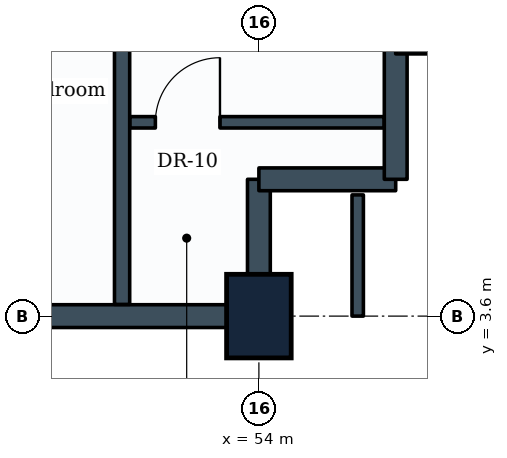
"""IFC4 building model, lengths in metres.
Left out: names, types, materials, properties, quantities, classifications, styles, units other than length and angle.
Written with IfcOpenShell. Run it as: python <this file> out.ifc"""

import sys

from ifc_helpers import new_model, si_unit, direction, frame, frame_2d, origin, origin_2d, place, context, subcontext, project, spatial, rectangle, extrude, element, fill, save


model = new_model("IFC4")
c1 = context("Model", 3, precision=1e-05, world=origin(), true_north=direction((0.0, 1.0)))
c2 = subcontext(c1, "Body", "Model", "MODEL_VIEW")
j1 = project(units=[si_unit("LENGTHUNIT", "METRE"), si_unit("PLANEANGLEUNIT", "RADIAN")], contexts=[c1])
p1 = place(None, origin())
s1 = spatial("IfcSite", under=j1, at=p1, CompositionType="ELEMENT")
p2 = place(p1, origin())
s2 = spatial("IfcBuilding", under=s1, at=p2, CompositionType="ELEMENT")
p3 = place(p2, frame((0.0, 0.0, 123.8)))
s3 = spatial("IfcBuildingStorey", under=s2, at=p3, CompositionType="ELEMENT", Elevation=123.8)
p4 = place(p3, frame((54.0, 3.6, 0.0), z_axis=(0.0, 0.0, 1.0), x_axis=(1.0, 0.0, 0.0)))
e1 = element("IfcColumn", 1, at=p4, inside=s3, PredefinedType="COLUMN", context=c2, shape_type="SweptSolid", body=[
    extrude(rectangle(XDim=0.85, YDim=1.1, at=origin_2d()), origin(), (0.0, 0.0, 1.0), 3.8),
])
p5 = place(p3, frame((54.0, 3.6, 0.0), z_axis=(0.0, 0.0, 1.0), x_axis=(-1.0, 0.0, 0.0)))
e2 = element("IfcWall", 2, at=p5, inside=s3, PredefinedType="STANDARD", context=c2, shape_type="SweptSolid", body=[
    extrude(rectangle(XDim=3.6, YDim=0.3, at=frame_2d((1.8, 0.0))), origin(), (0.0, 0.0, 1.0), 2.43),
])
p6 = place(p3, frame((54.0, 5.4, 0.0), z_axis=(0.0, 0.0, 1.0), x_axis=(0.0, -1.0, 0.0)))
e3 = element("IfcWall", 3, at=p6, inside=s3, PredefinedType="STANDARD", context=c2, shape_type="SweptSolid", body=[
    extrude(rectangle(XDim=1.8, YDim=0.3, at=frame_2d((0.9, 0.0))), origin(), (0.0, 0.0, 1.0), 2.43),
])
p7 = place(p3, frame((55.8, 5.4, 0.0), z_axis=(0.0, 0.0, 1.0), x_axis=(-1.0, 0.0, 0.0)))
e4 = element("IfcWall", 4, at=p7, inside=s3, PredefinedType="STANDARD", context=c2, shape_type="SweptSolid", body=[
    extrude(rectangle(XDim=1.8, YDim=0.3, at=frame_2d((0.9, 0.0))), origin(), (0.0, 0.0, 1.0), 2.43),
])
p8 = place(p3, frame((55.8, 7.2, 0.0), z_axis=(0.0, 0.0, 1.0), x_axis=(0.0, -1.0, 0.0)))
e5 = element("IfcWall", 5, at=p8, inside=s3, PredefinedType="STANDARD", context=c2, shape_type="SweptSolid", body=[
    extrude(rectangle(XDim=1.8, YDim=0.3, at=frame_2d((0.9, 0.0))), origin(), (0.0, 0.0, 1.0), 3.465),
])
p9 = place(p3, frame((57.6, 7.2, 0.0), z_axis=(0.0, 0.0, 1.0), x_axis=(-1.0, 0.0, 0.0)))
e6 = element("IfcWall", 6, at=p9, inside=s3, PredefinedType="STANDARD", context=c2, shape_type="SweptSolid", body=[
    extrude(rectangle(XDim=1.8, YDim=0.3, at=frame_2d((0.9, 0.0))), origin(), (0.0, 0.0, 1.0), 2.43),
])
p10 = place(p3, frame((52.2, 3.754, 0.0), z_axis=(0.0, 0.0, 1.0), x_axis=(0.0, 1.0, 0.0)))
e7 = element("IfcWall", 7, at=p10, inside=s3, PredefinedType="PARTITIONING", context=c2, shape_type="SweptSolid", body=[
    extrude(rectangle(XDim=6.792, YDim=0.2, at=frame_2d((3.396, 0.0))), origin(), (0.0, 0.0, 1.0), 3.465),
])
p11 = place(p3, frame((52.304, 6.15, 0.0), z_axis=(0.0, 0.0, 1.0), x_axis=(1.0, 0.0, 0.0)))
e8 = element("IfcWall", 8, at=p11, inside=s3, PredefinedType="PARTITIONING", context=c2, shape_type="SweptSolid", body=[
    extrude(rectangle(XDim=3.342, YDim=0.15, at=frame_2d((1.671, 0.0))), origin(), (0.0, 0.0, 1.0), 2.43),
])
p12 = place(p11, frame((0.334, 0.0, 0.0)))
e9 = element("IfcOpeningElement", 9, at=p12, cuts=e8, PredefinedType="OPENING", context=c2, shape_type="SweptSolid", body=[
    extrude(rectangle(XDim=0.85, YDim=2.1, at=frame_2d((0.425, 1.05))), frame((0.0, 0.085, 0.0), z_axis=(0.0, -1.0, 0.0), x_axis=(1.0, 0.0, 0.0)), (0.0, 0.0, 1.0), 0.17),
])
p13 = place(p3, frame((55.3, 3.6, 0.0), z_axis=(0.0, 0.0, 1.0), x_axis=(0.0, 1.0, 0.0)))
e10 = element("IfcWall", 10, at=p13, inside=s3, PredefinedType="PARTITIONING", context=c2, shape_type="SweptSolid", body=[
    extrude(rectangle(XDim=1.595, YDim=0.15, at=frame_2d((0.797, 0.0))), origin(), (0.0, 0.0, 1.0), 3.465),
])
p14 = place(p12, origin())
e11 = element("IfcDoor", 11, at=p14, inside=s3, OperationType="SINGLE_SWING_RIGHT", PredefinedType="DOOR", context=c2, shape_type="SweptSolid", body=[
    extrude(rectangle(XDim=0.85, YDim=2.1, at=frame_2d((0.425, 1.05))), frame((0.0, 0.025, 0.0), z_axis=(0.0, -1.0, 0.0), x_axis=(1.0, 0.0, 0.0)), (0.0, 0.0, 1.0), 0.05),
])
fill(e9, e11)
save(model, sys.argv[1])
